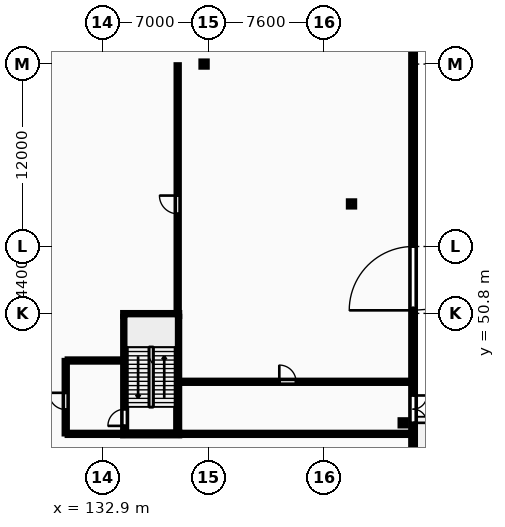
"""IFC4 building model, lengths in metres.
Left out: names, types, materials, properties, quantities, classifications, styles, units other than length and angle.
Written with IfcOpenShell. Run it as: python <this file> out.ifc"""

import sys

from ifc_helpers import new_model, si_unit, direction, frame, frame_2d, origin, origin_2d, place, context, subcontext, project, spatial, rectangle, i_section, extrude, element, fill, save


model = new_model("IFC4")
c1 = context("Model", 3, precision=1e-05, world=origin(), true_north=direction((0.0, 1.0)))
c2 = subcontext(c1, "Body", "Model", "MODEL_VIEW")
j1 = project(units=[si_unit("LENGTHUNIT", "METRE"), si_unit("PLANEANGLEUNIT", "RADIAN")], contexts=[c1])
p1 = place(None, origin())
s1 = spatial("IfcSite", under=j1, at=p1, CompositionType="ELEMENT")
p2 = place(p1, origin())
s2 = spatial("IfcBuilding", under=s1, at=p2, CompositionType="ELEMENT")
p3 = place(p2, origin())
s3 = spatial("IfcBuildingStorey", under=s2, at=p3, CompositionType="ELEMENT", Elevation=0.0)
for number, where, z_axis, x_axis in (
    (1, (139.6, 67.2, 0.0), (0.0, 0.0, 1.0), (1.0, 0.0, 0.0)),
    (2, (149.3, 58.0, 0.0), (0.0, 0.0, 1.0), (1.0, 0.0, 0.0)),
    (3, (152.7, 43.6, 0.0), (0.0, 0.0, 1.0), (1.0, 0.0, 0.0)),
):
    element("IfcColumn", number, at=place(p3, frame(where, z_axis=z_axis, x_axis=x_axis)), inside=s3, PredefinedType="COLUMN", context=c2, shape_type="SweptSolid", body=[
        extrude(i_section(OverallWidth=0.399, OverallDepth=0.394, WebThickness=0.023, FlangeThickness=0.037, FilletRadius=0.015, at=origin_2d()), origin(), (0.0, 0.0, 1.0), 5.4),
    ])
p4 = place(p3, frame((153.35, -26.5, 0.0), z_axis=(0.0, 0.0, 1.0), x_axis=(0.0, 1.0, 0.0)))
e4 = element("IfcWall", 4, at=p4, inside=s3, PredefinedType="STANDARD", context=c2, shape_type="SweptSolid", body=[
    extrude(rectangle(XDim=135.7, YDim=0.3, at=frame_2d((67.85, 0.0))), origin(), (0.0, 0.0, 1.0), 5.1),
])
p5 = place(p4, frame((60.8, 0.0, 0.0)))
e5 = element("IfcOpeningElement", 5, at=p5, cuts=e4, PredefinedType="OPENING", context=c2, shape_type="SweptSolid", body=[
    extrude(rectangle(XDim=7.2, YDim=3.2, at=frame_2d((3.6, 1.6))), frame((0.0, 0.16, 0.0), z_axis=(0.0, -1.0, 0.0), x_axis=(1.0, 0.0, 0.0)), (0.0, 0.0, 1.0), 0.32),
])
p6 = place(p4, frame((70.1, 0.0, 0.0)))
e6 = element("IfcOpeningElement", 6, at=p6, cuts=e4, PredefinedType="OPENING", context=c2, shape_type="SweptSolid", body=[
    extrude(rectangle(XDim=1.8, YDim=2.2, at=frame_2d((0.9, 1.1))), frame((0.0, 0.16, 0.0), z_axis=(0.0, -1.0, 0.0), x_axis=(1.0, 0.0, 0.0)), (0.0, 0.0, 1.0), 0.32),
])
p7 = place(p4, frame((77.5, 0.0, 0.0)))
e7 = element("IfcOpeningElement", 7, at=p7, cuts=e4, PredefinedType="OPENING", context=c2, shape_type="SweptSolid", body=[
    extrude(rectangle(XDim=4.2, YDim=3.6, at=frame_2d((2.1, 1.8))), frame((0.0, 0.16, 0.0), z_axis=(0.0, -1.0, 0.0), x_axis=(1.0, 0.0, 0.0)), (0.0, 0.0, 1.0), 0.32),
])
p8 = place(p4, frame((11.0, 0.0, 0.0)))
e8 = element("IfcOpeningElement", 8, at=p8, cuts=e4, PredefinedType="OPENING", context=c2, shape_type="SweptSolid", body=[
    extrude(rectangle(XDim=1.8, YDim=2.2, at=frame_2d((0.9, 1.1))), frame((0.0, 0.16, 0.0), z_axis=(0.0, -1.0, 0.0), x_axis=(1.0, 0.0, 0.0)), (0.0, 0.0, 1.0), 0.32),
])
p9 = place(p4, frame((105.8, 0.0, 0.0)))
e9 = element("IfcOpeningElement", 9, at=p9, cuts=e4, PredefinedType="OPENING", context=c2, shape_type="SweptSolid", body=[
    extrude(rectangle(XDim=1.8, YDim=2.2, at=frame_2d((0.9, 1.1))), frame((0.0, 0.16, 0.0), z_axis=(0.0, -1.0, 0.0), x_axis=(1.0, 0.0, 0.0)), (0.0, 0.0, 1.0), 0.32),
])
p10 = place(p3, frame((134.375, 43.0, 0.0), z_axis=(0.0, 0.0, 1.0), x_axis=(0.0, 1.0, 0.0)))
e10 = element("IfcWall", 10, at=p10, inside=s3, PredefinedType="SHEAR", context=c2, shape_type="SweptSolid", body=[
    extrude(rectangle(XDim=7.6, YDim=0.25, at=frame_2d((3.8, 0.0))), origin(), (0.0, 0.0, 1.0), 5.4),
])
p11 = place(p10, frame((0.4, 0.0, 0.0)))
e11 = element("IfcOpeningElement", 11, at=p11, cuts=e10, PredefinedType="OPENING", context=c2, shape_type="SweptSolid", body=[
    extrude(rectangle(XDim=1.1, YDim=2.1, at=frame_2d((0.55, 1.05))), frame((0.0, 0.135, 0.0), z_axis=(0.0, -1.0, 0.0), x_axis=(1.0, 0.0, 0.0)), (0.0, 0.0, 1.0), 0.27),
])
p12 = place(p3, frame((137.865, 43.0, 0.0), z_axis=(0.0, 0.0, 1.0), x_axis=(0.0, 1.0, 0.0)))
e12 = element("IfcWall", 12, at=p12, inside=s3, PredefinedType="SHEAR", context=c2, shape_type="SweptSolid", body=[
    extrude(rectangle(XDim=7.6, YDim=0.25, at=frame_2d((3.8, 0.0))), origin(), (0.0, 0.0, 1.0), 5.4),
])
for number, where, z_axis, x_axis in (
    (13, (134.25, 42.875, 0.0), (0.0, 0.0, 1.0), (1.0, 0.0, 0.0)),
    (14, (134.25, 50.725, 0.0), (0.0, 0.0, 1.0), (1.0, 0.0, 0.0)),
):
    element("IfcWall", number, at=place(p3, frame(where, z_axis=z_axis, x_axis=x_axis)), inside=s3, PredefinedType="SHEAR", context=c2, shape_type="SweptSolid", body=[
        extrude(rectangle(XDim=3.74, YDim=0.25, at=frame_2d((1.87, 0.0))), origin(), (0.0, 0.0, 1.0), 5.4),
    ])
p13 = place(p3, frame((130.5, 42.875, 0.0), z_axis=(0.0, 0.0, 1.0), x_axis=(0.0, 1.0, 0.0)))
e15 = element("IfcWall", 15, at=p13, inside=s3, PredefinedType="PARTITIONING", context=c2, shape_type="SweptSolid", body=[
    extrude(rectangle(XDim=4.825, YDim=0.2, at=frame_2d((2.413, 0.0))), origin(), (0.0, 0.0, 1.0), 5.1),
])
p14 = place(p13, frame((1.6, 0.0, 0.0)))
e16 = element("IfcOpeningElement", 16, at=p14, cuts=e15, PredefinedType="OPENING", context=c2, shape_type="SweptSolid", body=[
    extrude(rectangle(XDim=1.1, YDim=2.15, at=frame_2d((0.55, 1.075))), frame((0.0, 0.11, 0.0), z_axis=(0.0, -1.0, 0.0), x_axis=(1.0, 0.0, 0.0)), (0.0, 0.0, 1.0), 0.22),
])
p15 = place(p3, frame((130.6, 47.7, 0.0), z_axis=(0.0, 0.0, 1.0), x_axis=(1.0, 0.0, 0.0)))
e17 = element("IfcWall", 17, at=p15, inside=s3, PredefinedType="PARTITIONING", context=c2, shape_type="SweptSolid", body=[
    extrude(rectangle(XDim=3.65, YDim=0.2, at=frame_2d((1.825, 0.0))), origin(), (0.0, 0.0, 1.0), 5.1),
])
p16 = place(p3, frame((138.05, 46.3, 0.0), z_axis=(0.0, 0.0, 1.0), x_axis=(1.0, 0.0, 0.0)))
e18 = element("IfcWall", 18, at=p16, inside=s3, PredefinedType="PARTITIONING", context=c2, shape_type="SweptSolid", body=[
    extrude(rectangle(XDim=15.15, YDim=0.2, at=frame_2d((7.575, 0.0))), origin(), (0.0, 0.0, 1.0), 5.1),
])
p17 = place(p16, frame((6.5, 0.0, 0.0)))
e19 = element("IfcOpeningElement", 19, at=p17, cuts=e18, PredefinedType="OPENING", context=c2, shape_type="SweptSolid", body=[
    extrude(rectangle(XDim=1.1, YDim=2.1, at=frame_2d((0.55, 1.05))), frame((0.0, 0.11, 0.0), z_axis=(0.0, -1.0, 0.0), x_axis=(1.0, 0.0, 0.0)), (0.0, 0.0, 1.0), 0.22),
])
p18 = place(p3, frame((130.6, 42.875, 0.0), z_axis=(0.0, 0.0, 1.0), x_axis=(1.0, 0.0, 0.0)))
e20 = element("IfcWall", 20, at=p18, inside=s3, PredefinedType="PARTITIONING", context=c2, shape_type="SweptSolid", body=[
    extrude(rectangle(XDim=3.65, YDim=0.2, at=frame_2d((1.825, 0.0))), origin(), (0.0, 0.0, 1.0), 5.1),
])
p19 = place(p3, frame((138.05, 42.875, 0.0), z_axis=(0.0, 0.0, 1.0), x_axis=(1.0, 0.0, 0.0)))
e21 = element("IfcWall", 21, at=p19, inside=s3, PredefinedType="PARTITIONING", context=c2, shape_type="SweptSolid", body=[
    extrude(rectangle(XDim=15.15, YDim=0.2, at=frame_2d((7.575, 0.0))), origin(), (0.0, 0.0, 1.0), 5.1),
])
p20 = place(p3, frame((137.865, 50.85, 0.0), z_axis=(0.0, 0.0, 1.0), x_axis=(0.0, 1.0, 0.0)))
e22 = element("IfcWall", 22, at=p20, inside=s3, PredefinedType="PARTITIONING", context=c2, shape_type="SweptSolid", body=[
    extrude(rectangle(XDim=16.3, YDim=0.2, at=frame_2d((8.15, 0.0))), origin(), (0.0, 0.0, 1.0), 5.1),
])
p21 = place(p20, frame((6.5, 0.0, 0.0)))
e23 = element("IfcOpeningElement", 23, at=p21, cuts=e22, PredefinedType="OPENING", context=c2, shape_type="SweptSolid", body=[
    extrude(rectangle(XDim=1.2, YDim=2.15, at=frame_2d((0.6, 1.075))), frame((0.0, 0.11, 0.0), z_axis=(0.0, -1.0, 0.0), x_axis=(1.0, 0.0, 0.0)), (0.0, 0.0, 1.0), 0.22),
])
p22 = place(p6, frame((1.8, 0.0, 0.0), z_axis=(0.0, 0.0, 1.0), x_axis=(-1.0, 0.0, 0.0)))
e24 = element("IfcDoor", 24, at=p22, inside=s3, OperationType="DOUBLE_DOOR_SINGLE_SWING", PredefinedType="DOOR", context=c2, shape_type="SweptSolid", body=[
    extrude(rectangle(XDim=1.8, YDim=2.2, at=frame_2d((0.9, 1.1))), frame((0.0, 0.025, 0.0), z_axis=(0.0, -1.0, 0.0), x_axis=(1.0, 0.0, 0.0)), (0.0, 0.0, 1.0), 0.05),
])
fill(e6, e24)
p23 = place(p7, origin())
e25 = element("IfcDoor", 25, at=p23, inside=s3, OperationType="FOLDING_TO_LEFT", PredefinedType="GATE", context=c2, shape_type="SweptSolid", body=[
    extrude(rectangle(XDim=4.2, YDim=3.6, at=frame_2d((2.1, 1.8))), frame((0.0, 0.025, 0.0), z_axis=(0.0, -1.0, 0.0), x_axis=(1.0, 0.0, 0.0)), (0.0, 0.0, 1.0), 0.05),
])
fill(e7, e25)
p24 = place(p11, origin())
e26 = element("IfcDoor", 26, at=p24, inside=s3, OperationType="SINGLE_SWING_LEFT", PredefinedType="DOOR", context=c2, shape_type="SweptSolid", body=[
    extrude(rectangle(XDim=1.1, YDim=2.1, at=frame_2d((0.55, 1.05))), frame((0.0, 0.025, 0.0), z_axis=(0.0, -1.0, 0.0), x_axis=(1.0, 0.0, 0.0)), (0.0, 0.0, 1.0), 0.05),
])
fill(e11, e26)
p25 = place(p14, origin())
e27 = element("IfcDoor", 27, at=p25, inside=s3, OperationType="SINGLE_SWING_RIGHT", PredefinedType="DOOR", context=c2, shape_type="SweptSolid", body=[
    extrude(rectangle(XDim=1.1, YDim=2.15, at=frame_2d((0.55, 1.075))), frame((0.0, 0.025, 0.0), z_axis=(0.0, -1.0, 0.0), x_axis=(1.0, 0.0, 0.0)), (0.0, 0.0, 1.0), 0.05),
])
fill(e16, e27)
p26 = place(p17, origin())
e28 = element("IfcDoor", 28, at=p26, inside=s3, OperationType="SINGLE_SWING_LEFT", PredefinedType="DOOR", context=c2, shape_type="SweptSolid", body=[
    extrude(rectangle(XDim=1.1, YDim=2.1, at=frame_2d((0.55, 1.05))), frame((0.0, 0.025, 0.0), z_axis=(0.0, -1.0, 0.0), x_axis=(1.0, 0.0, 0.0)), (0.0, 0.0, 1.0), 0.05),
])
fill(e19, e28)
p27 = place(p21, origin())
e29 = element("IfcDoor", 29, at=p27, inside=s3, OperationType="SINGLE_SWING_RIGHT", PredefinedType="DOOR", context=c2, shape_type="SweptSolid", body=[
    extrude(rectangle(XDim=1.2, YDim=2.15, at=frame_2d((0.6, 1.075))), frame((0.0, 0.025, 0.0), z_axis=(0.0, -1.0, 0.0), x_axis=(1.0, 0.0, 0.0)), (0.0, 0.0, 1.0), 0.05),
])
fill(e23, e29)
save(model, sys.argv[1])
